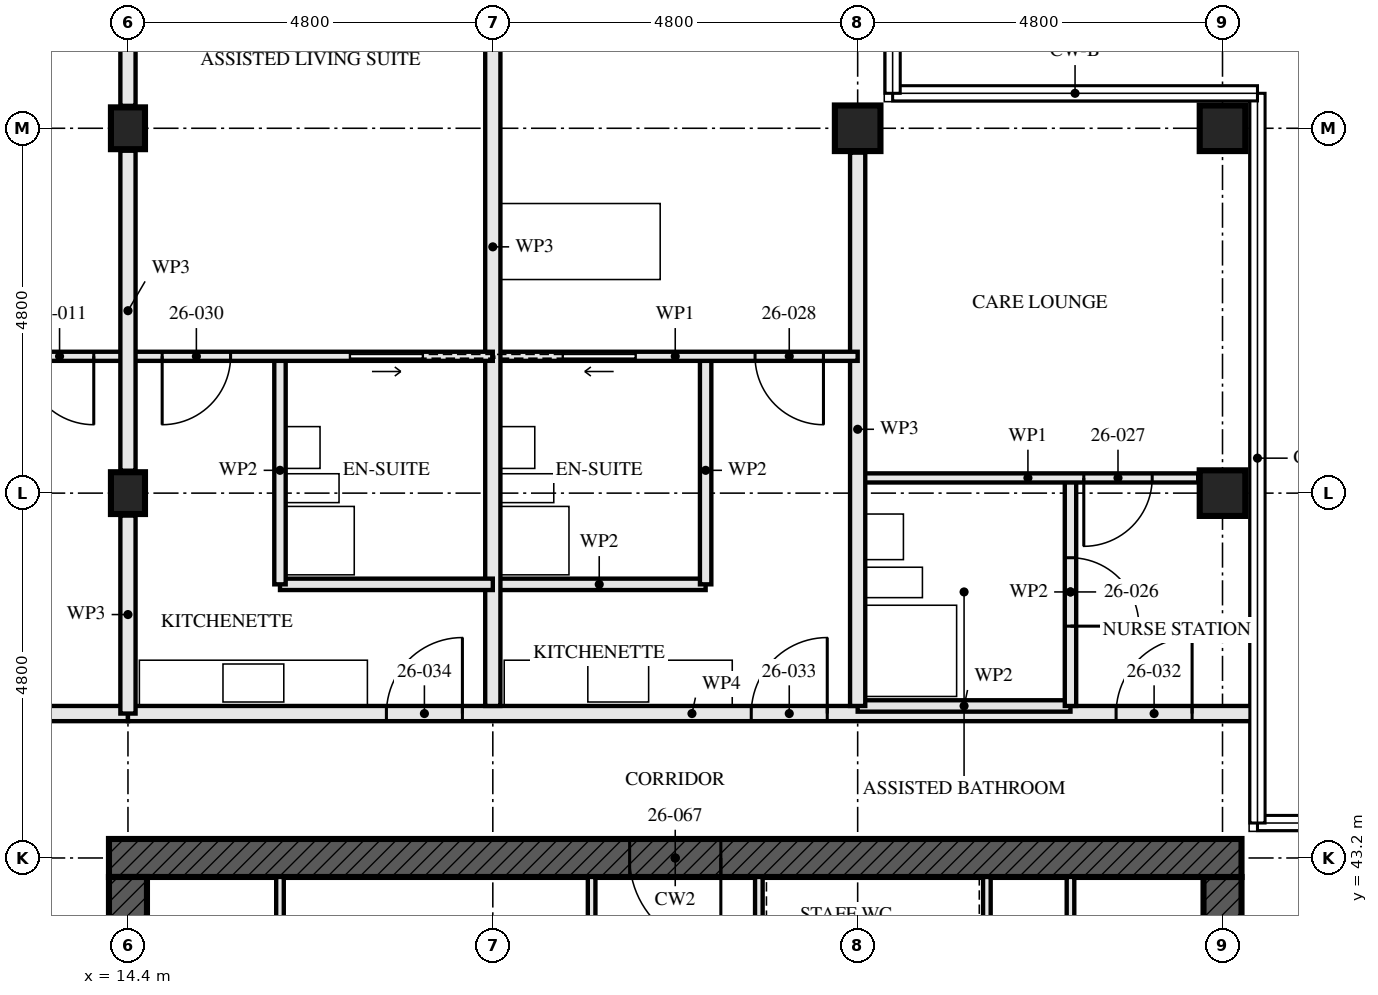
"""IFC4 building model, lengths in metres.
Left out: names, types, materials, properties, quantities, classifications, styles, units other than length and angle.
Written with IfcOpenShell. Run it as: python <this file> out.ifc"""

import sys

from ifc_helpers import new_model, si_unit, direction, frame, frame_2d, origin, origin_2d, place, context, subcontext, project, spatial, rectangle, hollow_rectangle, i_section, extrude, element, fill, save


model = new_model("IFC4")
c1 = context("Model", 3, precision=1e-05, world=origin(), true_north=direction((0.0, 1.0)))
c2 = subcontext(c1, "Body", "Model", "MODEL_VIEW")
j1 = project(units=[si_unit("LENGTHUNIT", "METRE"), si_unit("PLANEANGLEUNIT", "RADIAN")], contexts=[c1])
p1 = place(None, origin())
s1 = spatial("IfcSite", under=j1, at=p1, CompositionType="ELEMENT")
p2 = place(p1, origin())
s2 = spatial("IfcBuilding", under=s1, at=p2, CompositionType="ELEMENT")
p3 = place(p2, frame((0.0, 0.0, 98.0)))
s3 = spatial("IfcBuildingStorey", under=s2, at=p3, CompositionType="ELEMENT", Elevation=98.0)
for number, where, z_axis, x_axis in (
    (1, (14.4, 48.0, 0.0), (0.0, 0.0, 1.0), (1.0, 0.0, 0.0)),
    (2, (14.4, 52.8, 0.0), (0.0, 0.0, 1.0), (1.0, 0.0, 0.0)),
):
    element("IfcColumn", number, at=place(p3, frame(where, z_axis=z_axis, x_axis=x_axis)), inside=s3, PredefinedType="COLUMN", context=c2, shape_type="SweptSolid", body=[
        extrude(i_section(OverallWidth=0.448, OverallDepth=0.55, WebThickness=0.072, FlangeThickness=0.115, FilletRadius=0.015, at=origin_2d()), origin(), (0.0, 0.0, 1.0), 3.5),
    ])
p4 = place(p3, frame((24.0, 52.8, 0.0), z_axis=(0.0, 0.0, 1.0), x_axis=(0.0, 1.0, 0.0)))
e3 = element("IfcColumn", 3, at=p4, inside=s3, PredefinedType="COLUMN", context=c2, shape_type="SweptSolid", body=[
    extrude(hollow_rectangle(XDim=0.6, YDim=0.6, WallThickness=0.06, at=origin_2d()), origin(), (0.0, 0.0, 1.0), 3.5),
])
p5 = place(p3, frame((28.8, 48.0, 0.0), z_axis=(0.0, 0.0, 1.0), x_axis=(1.0, 0.0, 0.0)))
e4 = element("IfcColumn", 4, at=p5, inside=s3, PredefinedType="COLUMN", context=c2, shape_type="SweptSolid", body=[
    extrude(hollow_rectangle(XDim=0.6, YDim=0.6, WallThickness=0.08, at=origin_2d()), origin(), (0.0, 0.0, 1.0), 3.5),
])
p6 = place(p3, frame((28.8, 52.8, 0.0), z_axis=(0.0, 0.0, 1.0), x_axis=(0.0, 1.0, 0.0)))
e5 = element("IfcColumn", 5, at=p6, inside=s3, PredefinedType="COLUMN", context=c2, shape_type="SweptSolid", body=[
    extrude(hollow_rectangle(XDim=0.6, YDim=0.6, WallThickness=0.06, at=origin_2d()), origin(), (0.0, 0.0, 1.0), 3.5),
])
p7 = place(p3, frame((29.05, 43.2, -0.17), z_axis=(0.0, 0.0, 1.0), x_axis=(-1.0, 0.0, 0.0)))
e6 = element("IfcWall", 6, at=p7, inside=s3, PredefinedType="SHEAR", context=c2, shape_type="SweptSolid", body=[
    extrude(rectangle(XDim=14.9, YDim=0.5, at=frame_2d((7.45, 0.0))), origin(), (0.0, 0.0, 1.0), 3.5),
])
p8 = place(p7, frame((6.85, 0.0, 0.17)))
e7 = element("IfcOpeningElement", 7, at=p8, cuts=e6, PredefinedType="OPENING", context=c2, shape_type="SweptSolid", body=[
    extrude(rectangle(XDim=1.2, YDim=2.1, at=frame_2d((0.6, 1.05))), frame((0.0, 0.26, 0.0), z_axis=(0.0, -1.0, 0.0), x_axis=(1.0, 0.0, 0.0)), (0.0, 0.0, 1.0), 0.521),
])
p9 = place(p3, frame((14.4, 42.95, -0.17), z_axis=(0.0, 0.0, 1.0), x_axis=(0.0, -1.0, 0.0)))
e8 = element("IfcWall", 8, at=p9, inside=s3, PredefinedType="SHEAR", context=c2, shape_type="SweptSolid", body=[
    extrude(rectangle(XDim=13.9, YDim=0.5, at=frame_2d((6.95, 0.0))), origin(), (0.0, 0.0, 1.0), 3.5),
])
p10 = place(p9, frame((6.35, 0.0, 0.17)))
e9 = element("IfcOpeningElement", 9, at=p10, cuts=e8, PredefinedType="OPENING", context=c2, shape_type="SweptSolid", body=[
    extrude(rectangle(XDim=1.2, YDim=2.1, at=frame_2d((0.6, 1.05))), frame((0.0, 0.26, 0.0), z_axis=(0.0, -1.0, 0.0), x_axis=(1.0, 0.0, 0.0)), (0.0, 0.0, 1.0), 0.521),
])
p11 = place(p3, frame((28.8, 29.05, -0.17), z_axis=(0.0, 0.0, 1.0), x_axis=(0.0, 1.0, 0.0)))
e10 = element("IfcWall", 10, at=p11, inside=s3, PredefinedType="SHEAR", context=c2, shape_type="SweptSolid", body=[
    extrude(rectangle(XDim=13.9, YDim=0.5, at=frame_2d((6.95, 0.0))), origin(), (0.0, 0.0, 1.0), 3.5),
])
p12 = place(p11, frame((6.35, 0.0, 0.17)))
e11 = element("IfcOpeningElement", 11, at=p12, cuts=e10, PredefinedType="OPENING", context=c2, shape_type="SweptSolid", body=[
    extrude(rectangle(XDim=1.2, YDim=2.1, at=frame_2d((0.6, 1.05))), frame((0.0, 0.26, 0.0), z_axis=(0.0, -1.0, 0.0), x_axis=(1.0, 0.0, 0.0)), (0.0, 0.0, 1.0), 0.521),
])
p13 = place(p3, frame((14.4, 49.8, 0.0), z_axis=(0.0, 0.0, 1.0), x_axis=(-1.0, 0.0, 0.0)))
e12 = element("IfcWall", 12, at=p13, inside=s3, PredefinedType="PARTITIONING", context=c2, shape_type="SweptSolid", body=[
    extrude(rectangle(XDim=4.8, YDim=0.12, at=frame_2d((2.4, 0.0))), origin(), (0.0, 0.0, 1.0), 3.33),
])
p14 = place(p13, frame((0.45, 0.0, 0.0)))
e13 = element("IfcOpeningElement", 13, at=p14, cuts=e12, PredefinedType="OPENING", context=c2, shape_type="SweptSolid", body=[
    extrude(rectangle(XDim=0.9, YDim=2.1, at=frame_2d((0.45, 1.05))), frame((0.0, 0.071, 0.0), z_axis=(0.0, -1.0, 0.0), x_axis=(1.0, 0.0, 0.0)), (0.0, 0.0, 1.0), 0.141),
])
p15 = place(p3, frame((14.4, 45.1, 0.0), z_axis=(0.0, 0.0, 1.0), x_axis=(-1.0, 0.0, 0.0)))
e14 = element("IfcWall", 14, at=p15, inside=s3, PredefinedType="PARTITIONING", context=c2, shape_type="SweptSolid", body=[
    extrude(rectangle(XDim=9.6, YDim=0.2, at=frame_2d((4.8, 0.0))), origin(), (0.0, 0.0, 1.0), 3.33),
])
p16 = place(p15, frame((5.2, 0.0, 0.0)))
e15 = element("IfcOpeningElement", 15, at=p16, cuts=e14, PredefinedType="OPENING", context=c2, shape_type="SweptSolid", body=[
    extrude(rectangle(XDim=1.0, YDim=2.1, at=frame_2d((0.5, 1.05))), frame((0.0, 0.111, 0.0), z_axis=(0.0, -1.0, 0.0), x_axis=(1.0, 0.0, 0.0)), (0.0, 0.0, 1.0), 0.221),
])
p17 = place(p3, frame((26.8, 48.2, 0.0), z_axis=(0.0, 0.0, 1.0), x_axis=(0.0, -1.0, 0.0)))
e16 = element("IfcWall", 16, at=p17, inside=s3, PredefinedType="PARTITIONING", context=c2, shape_type="SweptSolid", body=[
    extrude(rectangle(XDim=3.0, YDim=0.15, at=frame_2d((1.5, 0.0))), origin(), (0.0, 0.0, 1.0), 2.55),
])
p18 = place(p17, frame((1.05, 0.0, 0.0)))
e17 = element("IfcOpeningElement", 17, at=p18, cuts=e16, PredefinedType="OPENING", context=c2, shape_type="SweptSolid", body=[
    extrude(rectangle(XDim=0.9, YDim=2.1, at=frame_2d((0.45, 1.05))), frame((0.0, 0.085, 0.0), z_axis=(0.0, -1.0, 0.0), x_axis=(1.0, 0.0, 0.0)), (0.0, 0.0, 1.0), 0.171),
])
p19 = place(p3, frame((26.8, 45.2, 0.0), z_axis=(0.0, 0.0, 1.0), x_axis=(-1.0, 0.0, 0.0)))
e18 = element("IfcWall", 18, at=p19, inside=s3, PredefinedType="PARTITIONING", context=c2, shape_type="SweptSolid", body=[
    extrude(rectangle(XDim=2.8, YDim=0.15, at=frame_2d((1.4, 0.0))), origin(), (0.0, 0.0, 1.0), 3.33),
])
p20 = place(p3, frame((28.48, 48.2, 0.0), z_axis=(0.0, 0.0, 1.0), x_axis=(-1.0, 0.0, 0.0)))
e19 = element("IfcWall", 19, at=p20, inside=s3, PredefinedType="PARTITIONING", context=c2, shape_type="SweptSolid", body=[
    extrude(rectangle(XDim=4.48, YDim=0.12, at=frame_2d((2.24, 0.0))), origin(), (0.0, 0.0, 1.0), 3.33),
])
p21 = place(p20, frame((0.605, 0.0, 0.0)))
e20 = element("IfcOpeningElement", 20, at=p21, cuts=e19, PredefinedType="OPENING", context=c2, shape_type="SweptSolid", body=[
    extrude(rectangle(XDim=0.9, YDim=2.1, at=frame_2d((0.45, 1.05))), frame((0.0, 0.071, 0.0), z_axis=(0.0, -1.0, 0.0), x_axis=(1.0, 0.0, 0.0)), (0.0, 0.0, 1.0), 0.141),
])
p22 = place(p3, frame((24.0, 52.48, 0.0), z_axis=(0.0, 0.0, 1.0), x_axis=(0.0, -1.0, 0.0)))
e21 = element("IfcWall", 21, at=p22, inside=s3, PredefinedType="PARTITIONING", context=c2, shape_type="SweptSolid", body=[
    extrude(rectangle(XDim=7.28, YDim=0.2, at=frame_2d((3.64, 0.0))), origin(), (0.0, 0.0, 1.0), 2.55),
])
p23 = place(p3, frame((22.0, 49.8, 0.0), z_axis=(0.0, 0.0, 1.0), x_axis=(0.0, -1.0, 0.0)))
e22 = element("IfcWall", 22, at=p23, inside=s3, PredefinedType="PARTITIONING", context=c2, shape_type="SweptSolid", body=[
    extrude(rectangle(XDim=3.0, YDim=0.15, at=frame_2d((1.5, 0.0))), origin(), (0.0, 0.0, 1.0), 2.55),
])
p24 = place(p3, frame((22.0, 46.8, 0.0), z_axis=(0.0, 0.0, 1.0), x_axis=(-1.0, 0.0, 0.0)))
e23 = element("IfcWall", 23, at=p24, inside=s3, PredefinedType="PARTITIONING", context=c2, shape_type="SweptSolid", body=[
    extrude(rectangle(XDim=2.8, YDim=0.15, at=frame_2d((1.4, 0.0))), origin(), (0.0, 0.0, 1.0), 3.33),
])
p25 = place(p3, frame((24.0, 49.8, 0.0), z_axis=(0.0, 0.0, 1.0), x_axis=(-1.0, 0.0, 0.0)))
e24 = element("IfcWall", 24, at=p25, inside=s3, PredefinedType="PARTITIONING", context=c2, shape_type="SweptSolid", body=[
    extrude(rectangle(XDim=4.8, YDim=0.12, at=frame_2d((2.4, 0.0))), origin(), (0.0, 0.0, 1.0), 3.33),
])
p26 = place(p25, frame((0.45, 0.0, 0.0)))
e25 = element("IfcOpeningElement", 25, at=p26, cuts=e24, PredefinedType="OPENING", context=c2, shape_type="SweptSolid", body=[
    extrude(rectangle(XDim=0.9, YDim=2.1, at=frame_2d((0.45, 1.05))), frame((0.0, 0.071, 0.0), z_axis=(0.0, -1.0, 0.0), x_axis=(1.0, 0.0, 0.0)), (0.0, 0.0, 1.0), 0.141),
])
p27 = place(p25, frame((2.925, 0.0, 0.0)))
e26 = element("IfcOpeningElement", 26, at=p27, cuts=e24, PredefinedType="OPENING", context=c2, shape_type="SweptSolid", body=[
    extrude(rectangle(XDim=0.95, YDim=2.1, at=frame_2d((0.475, 1.05))), frame((0.0, 0.071, 0.0), z_axis=(0.0, -1.0, 0.0), x_axis=(1.0, 0.0, 0.0)), (0.0, 0.0, 1.0), 0.141),
])
p28 = place(p3, frame((19.2, 57.28, 0.0), z_axis=(0.0, 0.0, 1.0), x_axis=(0.0, -1.0, 0.0)))
e27 = element("IfcWall", 27, at=p28, inside=s3, PredefinedType="PARTITIONING", context=c2, shape_type="SweptSolid", body=[
    extrude(rectangle(XDim=12.08, YDim=0.2, at=frame_2d((6.04, 0.0))), origin(), (0.0, 0.0, 1.0), 2.55),
])
p29 = place(p3, frame((16.4, 49.8, 0.0), z_axis=(0.0, 0.0, 1.0), x_axis=(0.0, -1.0, 0.0)))
e28 = element("IfcWall", 28, at=p29, inside=s3, PredefinedType="PARTITIONING", context=c2, shape_type="SweptSolid", body=[
    extrude(rectangle(XDim=3.0, YDim=0.15, at=frame_2d((1.5, 0.0))), origin(), (0.0, 0.0, 1.0), 2.55),
])
p30 = place(p3, frame((19.2, 46.8, 0.0), z_axis=(0.0, 0.0, 1.0), x_axis=(-1.0, 0.0, 0.0)))
e29 = element("IfcWall", 29, at=p30, inside=s3, PredefinedType="PARTITIONING", context=c2, shape_type="SweptSolid", body=[
    extrude(rectangle(XDim=2.8, YDim=0.15, at=frame_2d((1.4, 0.0))), origin(), (0.0, 0.0, 1.0), 3.33),
])
p31 = place(p3, frame((19.2, 49.8, 0.0), z_axis=(0.0, 0.0, 1.0), x_axis=(-1.0, 0.0, 0.0)))
e30 = element("IfcWall", 30, at=p31, inside=s3, PredefinedType="PARTITIONING", context=c2, shape_type="SweptSolid", body=[
    extrude(rectangle(XDim=4.8, YDim=0.12, at=frame_2d((2.4, 0.0))), origin(), (0.0, 0.0, 1.0), 3.33),
])
p32 = place(p31, frame((3.45, 0.0, 0.0)))
e31 = element("IfcOpeningElement", 31, at=p32, cuts=e30, PredefinedType="OPENING", context=c2, shape_type="SweptSolid", body=[
    extrude(rectangle(XDim=0.9, YDim=2.1, at=frame_2d((0.45, 1.05))), frame((0.0, 0.071, 0.0), z_axis=(0.0, -1.0, 0.0), x_axis=(1.0, 0.0, 0.0)), (0.0, 0.0, 1.0), 0.141),
])
p33 = place(p31, frame((0.925, 0.0, 0.0)))
e32 = element("IfcOpeningElement", 32, at=p33, cuts=e30, PredefinedType="OPENING", context=c2, shape_type="SweptSolid", body=[
    extrude(rectangle(XDim=0.95, YDim=2.1, at=frame_2d((0.475, 1.05))), frame((0.0, 0.071, 0.0), z_axis=(0.0, -1.0, 0.0), x_axis=(1.0, 0.0, 0.0)), (0.0, 0.0, 1.0), 0.141),
])
p34 = place(p3, frame((29.24, 45.1, 0.0), z_axis=(0.0, 0.0, 1.0), x_axis=(-1.0, 0.0, 0.0)))
e33 = element("IfcWall", 33, at=p34, inside=s3, PredefinedType="PARTITIONING", context=c2, shape_type="SweptSolid", body=[
    extrude(rectangle(XDim=14.84, YDim=0.2, at=frame_2d((7.42, 0.0))), origin(), (0.0, 0.0, 1.0), 2.32),
])
p35 = place(p34, frame((0.84, 0.0, 0.0)))
e34 = element("IfcOpeningElement", 34, at=p35, cuts=e33, PredefinedType="OPENING", context=c2, shape_type="SweptSolid", body=[
    extrude(rectangle(XDim=1.0, YDim=2.1, at=frame_2d((0.5, 1.05))), frame((0.0, 0.111, 0.0), z_axis=(0.0, -1.0, 0.0), x_axis=(1.0, 0.0, 0.0)), (0.0, 0.0, 1.0), 0.221),
])
p36 = place(p34, frame((5.64, 0.0, 0.0)))
e35 = element("IfcOpeningElement", 35, at=p36, cuts=e33, PredefinedType="OPENING", context=c2, shape_type="SweptSolid", body=[
    extrude(rectangle(XDim=1.0, YDim=2.1, at=frame_2d((0.5, 1.05))), frame((0.0, 0.111, 0.0), z_axis=(0.0, -1.0, 0.0), x_axis=(1.0, 0.0, 0.0)), (0.0, 0.0, 1.0), 0.221),
])
p37 = place(p34, frame((10.44, 0.0, 0.0)))
e36 = element("IfcOpeningElement", 36, at=p37, cuts=e33, PredefinedType="OPENING", context=c2, shape_type="SweptSolid", body=[
    extrude(rectangle(XDim=1.0, YDim=2.1, at=frame_2d((0.5, 1.05))), frame((0.0, 0.111, 0.0), z_axis=(0.0, -1.0, 0.0), x_axis=(1.0, 0.0, 0.0)), (0.0, 0.0, 1.0), 0.221),
])
for number, where, z_axis, x_axis in (
    (37, (16.4, 37.15, 0.0), (0.0, 0.0, 1.0), (0.0, 1.0, 0.0)),
    (38, (26.8, 37.15, 0.0), (0.0, 0.0, 1.0), (0.0, 1.0, 0.0)),
):
    element("IfcWall", number, at=place(p3, frame(where, z_axis=z_axis, x_axis=x_axis)), inside=s3, PredefinedType="SOLIDWALL", context=c2, shape_type="SweptSolid", body=[
        extrude(rectangle(XDim=5.8, YDim=0.1, at=frame_2d((2.9, 0.0))), origin(), (0.0, 0.0, 1.0), 3.33),
    ])
p38 = place(p3, frame((20.5, 37.15, 0.0), z_axis=(0.0, 0.0, 1.0), x_axis=(0.0, 1.0, 0.0)))
e39 = element("IfcWall", 39, at=p38, inside=s3, PredefinedType="SOLIDWALL", context=c2, shape_type="SweptSolid", body=[
    extrude(rectangle(XDim=5.8, YDim=0.1, at=frame_2d((2.9, 0.0))), origin(), (0.0, 0.0, 1.0), 3.33),
])
p39 = place(p38, frame((0.925, 0.0, 0.0)))
e40 = element("IfcOpeningElement", 40, at=p39, cuts=e39, PredefinedType="OPENING", context=c2, shape_type="SweptSolid", body=[
    extrude(rectangle(XDim=1.0, YDim=2.1, at=frame_2d((0.5, 1.05))), frame((0.0, 0.061, 0.0), z_axis=(0.0, -1.0, 0.0), x_axis=(1.0, 0.0, 0.0)), (0.0, 0.0, 1.0), 0.121),
])
p40 = place(p3, frame((22.7, 37.15, 0.0), z_axis=(0.0, 0.0, 1.0), x_axis=(0.0, 1.0, 0.0)))
e41 = element("IfcWall", 41, at=p40, inside=s3, PredefinedType="SOLIDWALL", context=c2, shape_type="SweptSolid", body=[
    extrude(rectangle(XDim=5.8, YDim=0.1, at=frame_2d((2.9, 0.0))), origin(), (0.0, 0.0, 1.0), 3.33),
])
p41 = place(p40, frame((0.925, 0.0, 0.0)))
e42 = element("IfcOpeningElement", 42, at=p41, cuts=e41, PredefinedType="OPENING", context=c2, shape_type="SweptSolid", body=[
    extrude(rectangle(XDim=1.0, YDim=2.1, at=frame_2d((0.5, 1.05))), frame((0.0, 0.061, 0.0), z_axis=(0.0, -1.0, 0.0), x_axis=(1.0, 0.0, 0.0)), (0.0, 0.0, 1.0), 0.121),
])
p42 = place(p40, frame((3.9, 0.0, 0.0)))
e43 = element("IfcOpeningElement", 43, at=p42, cuts=e41, PredefinedType="OPENING", context=c2, shape_type="SweptSolid", body=[
    extrude(rectangle(XDim=1.0, YDim=2.1, at=frame_2d((0.5, 1.05))), frame((0.0, 0.061, 0.0), z_axis=(0.0, -1.0, 0.0), x_axis=(1.0, 0.0, 0.0)), (0.0, 0.0, 1.0), 0.121),
])
p43 = place(p3, frame((25.7, 37.15, 0.0), z_axis=(0.0, 0.0, 1.0), x_axis=(0.0, 1.0, 0.0)))
e44 = element("IfcWall", 44, at=p43, inside=s3, PredefinedType="SOLIDWALL", context=c2, shape_type="SweptSolid", body=[
    extrude(rectangle(XDim=5.8, YDim=0.1, at=frame_2d((2.9, 0.0))), origin(), (0.0, 0.0, 1.0), 3.33),
])
p44 = place(p3, frame((14.4, 45.1, 0.0), z_axis=(0.0, 0.0, 1.0), x_axis=(0.0, 1.0, 0.0)))
e45 = element("IfcWall", 45, at=p44, inside=s3, PredefinedType="PARTITIONING", context=c2, shape_type="SweptSolid", body=[
    extrude(rectangle(XDim=2.605, YDim=0.2, at=frame_2d((1.302, 0.0))), origin(), (0.0, 0.0, 1.0), 2.32),
])
p45 = place(p3, frame((14.4, 48.295, 0.0), z_axis=(0.0, 0.0, 1.0), x_axis=(0.0, 1.0, 0.0)))
e46 = element("IfcWall", 46, at=p45, inside=s3, PredefinedType="PARTITIONING", context=c2, shape_type="SweptSolid", body=[
    extrude(rectangle(XDim=4.21, YDim=0.2, at=frame_2d((2.105, 0.0))), origin(), (0.0, 0.0, 1.0), 2.32),
])
p46 = place(p3, frame((14.4, 53.095, 0.0), z_axis=(0.0, 0.0, 1.0), x_axis=(0.0, 1.0, 0.0)))
e47 = element("IfcWall", 47, at=p46, inside=s3, PredefinedType="PARTITIONING", context=c2, shape_type="SweptSolid", body=[
    extrude(rectangle(XDim=4.258, YDim=0.2, at=frame_2d((2.129, 0.0))), origin(), (0.0, 0.0, 1.0), 2.32),
])
p47 = place(p14, origin())
e48 = element("IfcDoor", 48, at=p47, inside=s3, OperationType="SINGLE_SWING_RIGHT", PredefinedType="DOOR", context=c2, shape_type="SweptSolid", body=[
    extrude(rectangle(XDim=0.9, YDim=2.1, at=frame_2d((0.45, 1.05))), frame((0.0, 0.022, 0.0), z_axis=(0.0, -1.0, 0.0), x_axis=(1.0, 0.0, 0.0)), (0.0, 0.0, 1.0), 0.044),
])
fill(e13, e48)
p48 = place(p18, origin())
e49 = element("IfcDoor", 49, at=p48, inside=s3, OperationType="SINGLE_SWING_LEFT", PredefinedType="DOOR", context=c2, shape_type="SweptSolid", body=[
    extrude(rectangle(XDim=0.9, YDim=2.1, at=frame_2d((0.45, 1.05))), frame((0.0, 0.022, 0.0), z_axis=(0.0, -1.0, 0.0), x_axis=(1.0, 0.0, 0.0)), (0.0, 0.0, 1.0), 0.044),
])
fill(e17, e49)
p49 = place(p21, origin())
e50 = element("IfcDoor", 50, at=p49, inside=s3, OperationType="SINGLE_SWING_LEFT", PredefinedType="DOOR", context=c2, shape_type="SweptSolid", body=[
    extrude(rectangle(XDim=0.9, YDim=2.1, at=frame_2d((0.45, 1.05))), frame((0.0, 0.022, 0.0), z_axis=(0.0, -1.0, 0.0), x_axis=(1.0, 0.0, 0.0)), (0.0, 0.0, 1.0), 0.044),
])
fill(e20, e50)
p50 = place(p26, origin())
e51 = element("IfcDoor", 51, at=p50, inside=s3, OperationType="SINGLE_SWING_RIGHT", PredefinedType="DOOR", context=c2, shape_type="SweptSolid", body=[
    extrude(rectangle(XDim=0.9, YDim=2.1, at=frame_2d((0.45, 1.05))), frame((0.0, 0.022, 0.0), z_axis=(0.0, -1.0, 0.0), x_axis=(1.0, 0.0, 0.0)), (0.0, 0.0, 1.0), 0.044),
])
fill(e25, e51)
p51 = place(p27, origin())
e52 = element("IfcDoor", 52, at=p51, inside=s3, OperationType="SLIDING_TO_LEFT", PredefinedType="DOOR", context=c2, shape_type="SweptSolid", body=[
    extrude(rectangle(XDim=0.95, YDim=2.1, at=frame_2d((0.475, 1.05))), frame((0.0, 0.022, 0.0), z_axis=(0.0, -1.0, 0.0), x_axis=(1.0, 0.0, 0.0)), (0.0, 0.0, 1.0), 0.044),
])
fill(e26, e52)
p52 = place(p32, origin())
e53 = element("IfcDoor", 53, at=p52, inside=s3, OperationType="SINGLE_SWING_LEFT", PredefinedType="DOOR", context=c2, shape_type="SweptSolid", body=[
    extrude(rectangle(XDim=0.9, YDim=2.1, at=frame_2d((0.45, 1.05))), frame((0.0, 0.022, 0.0), z_axis=(0.0, -1.0, 0.0), x_axis=(1.0, 0.0, 0.0)), (0.0, 0.0, 1.0), 0.044),
])
fill(e31, e53)
p53 = place(p33, origin())
e54 = element("IfcDoor", 54, at=p53, inside=s3, OperationType="SLIDING_TO_RIGHT", PredefinedType="DOOR", context=c2, shape_type="SweptSolid", body=[
    extrude(rectangle(XDim=0.95, YDim=2.1, at=frame_2d((0.475, 1.05))), frame((0.0, 0.022, 0.0), z_axis=(0.0, -1.0, 0.0), x_axis=(1.0, 0.0, 0.0)), (0.0, 0.0, 1.0), 0.044),
])
fill(e32, e54)
p54 = place(p35, frame((1.0, 0.0, 0.0), z_axis=(0.0, 0.0, 1.0), x_axis=(-1.0, 0.0, 0.0)))
e55 = element("IfcDoor", 55, at=p54, inside=s3, OperationType="SINGLE_SWING_LEFT", PredefinedType="DOOR", context=c2, shape_type="SweptSolid", body=[
    extrude(rectangle(XDim=1.0, YDim=2.1, at=frame_2d((0.5, 1.05))), frame((0.0, 0.027, 0.0), z_axis=(0.0, -1.0, 0.0), x_axis=(1.0, 0.0, 0.0)), (0.0, 0.0, 1.0), 0.054),
])
fill(e34, e55)
p55 = place(p36, frame((1.0, 0.0, 0.0), z_axis=(0.0, 0.0, 1.0), x_axis=(-1.0, 0.0, 0.0)))
e56 = element("IfcDoor", 56, at=p55, inside=s3, OperationType="SINGLE_SWING_LEFT", PredefinedType="DOOR", context=c2, shape_type="SweptSolid", body=[
    extrude(rectangle(XDim=1.0, YDim=2.1, at=frame_2d((0.5, 1.05))), frame((0.0, 0.027, 0.0), z_axis=(0.0, -1.0, 0.0), x_axis=(1.0, 0.0, 0.0)), (0.0, 0.0, 1.0), 0.054),
])
fill(e35, e56)
p56 = place(p37, frame((1.0, 0.0, 0.0), z_axis=(0.0, 0.0, 1.0), x_axis=(-1.0, 0.0, 0.0)))
e57 = element("IfcDoor", 57, at=p56, inside=s3, OperationType="SINGLE_SWING_LEFT", PredefinedType="DOOR", context=c2, shape_type="SweptSolid", body=[
    extrude(rectangle(XDim=1.0, YDim=2.1, at=frame_2d((0.5, 1.05))), frame((0.0, 0.027, 0.0), z_axis=(0.0, -1.0, 0.0), x_axis=(1.0, 0.0, 0.0)), (0.0, 0.0, 1.0), 0.054),
])
fill(e36, e57)
p57 = place(p8, origin())
e58 = element("IfcDoor", 58, at=p57, inside=s3, OperationType="SINGLE_SWING_LEFT", PredefinedType="DOOR", context=c2, shape_type="SweptSolid", body=[
    extrude(rectangle(XDim=1.2, YDim=2.1, at=frame_2d((0.6, 1.05))), frame((0.0, 0.027, 0.0), z_axis=(0.0, -1.0, 0.0), x_axis=(1.0, 0.0, 0.0)), (0.0, 0.0, 1.0), 0.054),
])
fill(e7, e58)
save(model, sys.argv[1])
